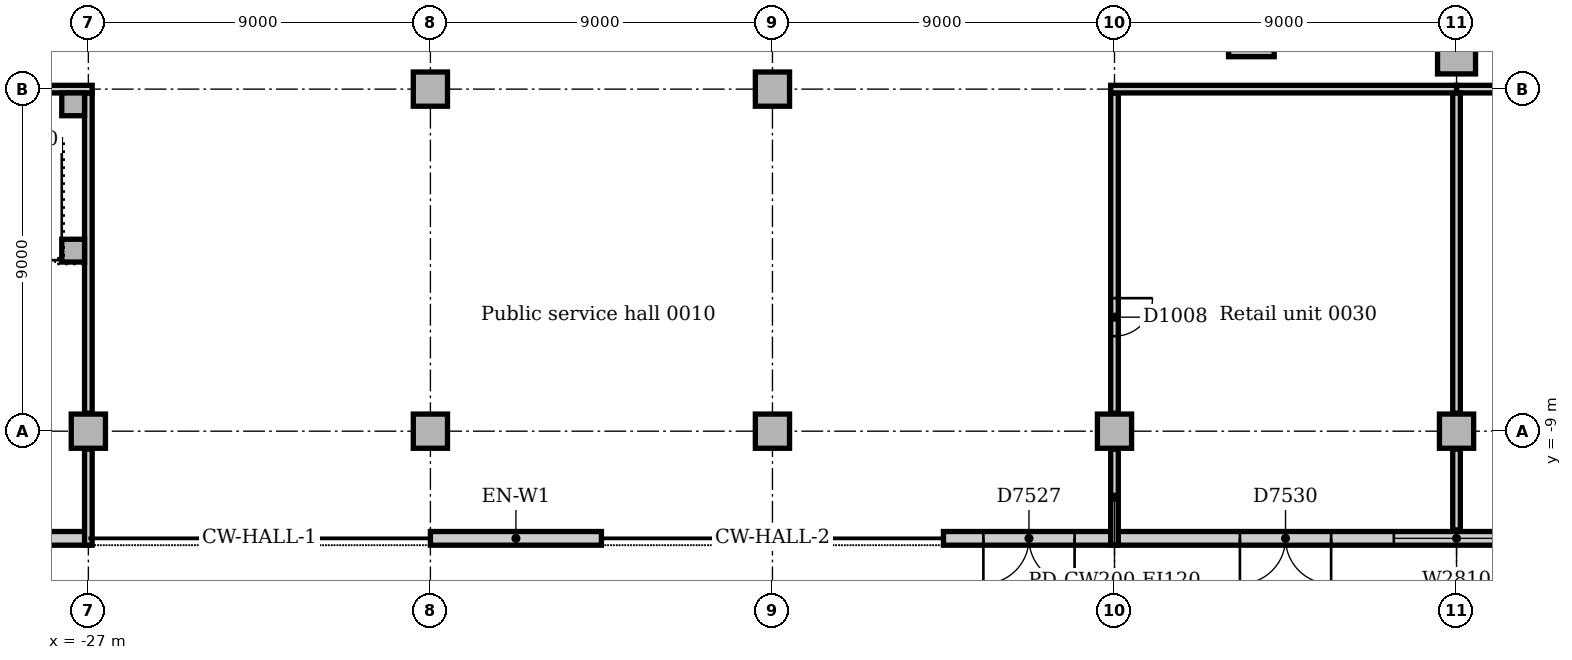
"""IFC4 building model, lengths in metres.
Left out: names, types, materials, properties, quantities, classifications, styles, units other than length and angle.
Written with IfcOpenShell. Run it as: python <this file> out.ifc"""

import sys

from ifc_helpers import new_model, si_unit, direction, frame, frame_2d, origin, origin_2d, place, context, subcontext, project, spatial, rectangle, extrude, element, fill, save


model = new_model("IFC4")
c1 = context("Model", 3, precision=1e-05, world=origin(), true_north=direction((0.0, 1.0)))
c2 = subcontext(c1, "Body", "Model", "MODEL_VIEW")
j1 = project(units=[si_unit("LENGTHUNIT", "METRE"), si_unit("PLANEANGLEUNIT", "RADIAN")], contexts=[c1])
p1 = place(None, origin())
s1 = spatial("IfcSite", under=j1, at=p1, CompositionType="ELEMENT")
p2 = place(p1, origin())
s2 = spatial("IfcBuilding", under=s1, at=p2, CompositionType="ELEMENT")
p3 = place(p2, origin())
s3 = spatial("IfcBuildingStorey", under=s2, at=p3, CompositionType="ELEMENT", Elevation=0.0)
p4 = place(p3, frame((3.602, 1.453, 0.0), z_axis=(0.0, 0.0, 1.0), x_axis=(1.0, 0.0, 0.0)))
e1 = element("IfcColumn", 1, at=p4, inside=s3, PredefinedType="COLUMN", context=c2, shape_type="SweptSolid", body=[
    extrude(rectangle(XDim=1.2, YDim=1.2, at=origin_2d()), origin(), (0.0, 0.0, 1.0), 5.7),
])
p5 = place(p3, frame((9.0, 0.9, 0.0), z_axis=(0.0, 0.0, 1.0), x_axis=(1.0, 0.0, 0.0)))
e2 = element("IfcColumn", 2, at=p5, inside=s3, PredefinedType="COLUMN", context=c2, shape_type="SweptSolid", body=[
    extrude(rectangle(XDim=1.0, YDim=1.0, at=origin_2d()), origin(), (0.0, 0.0, 1.0), 5.7),
])
for number, where, z_axis, x_axis in (
    (3, (-27.0, -9.0, 0.0), (0.0, 0.0, 1.0), (1.0, 0.0, 0.0)),
    (4, (-18.0, -9.0, 0.0), (0.0, 0.0, 1.0), (1.0, 0.0, 0.0)),
    (5, (-18.0, 0.0, 0.0), (0.0, 0.0, 1.0), (1.0, 0.0, 0.0)),
    (6, (-9.0, -9.0, 0.0), (0.0, 0.0, 1.0), (1.0, 0.0, 0.0)),
    (7, (-9.0, 0.0, 0.0), (0.0, 0.0, 1.0), (1.0, 0.0, 0.0)),
    (8, (0.0, -9.0, 0.0), (0.0, 0.0, 1.0), (1.0, 0.0, 0.0)),
    (9, (9.0, -9.0, 0.0), (0.0, 0.0, 1.0), (1.0, 0.0, 0.0)),
):
    element("IfcColumn", number, at=place(p3, frame(where, z_axis=z_axis, x_axis=x_axis)), inside=s3, PredefinedType="COLUMN", context=c2, shape_type="SweptSolid", body=[
        extrude(rectangle(XDim=0.9, YDim=0.9, at=origin_2d()), origin(), (0.0, 0.0, 1.0), 5.7),
    ])
p6 = place(p3, frame((-81.0, -11.82, 0.0), z_axis=(0.0, 0.0, 1.0), x_axis=(1.0, 0.0, 0.0)))
e10 = element("IfcWall", 10, at=p6, inside=s3, PredefinedType="STANDARD", context=c2, shape_type="SweptSolid", body=[
    extrude(rectangle(XDim=54.0, YDim=0.36, at=frame_2d((27.0, 0.0))), origin(), (0.0, 0.0, 1.0), 5.7),
])
p7 = place(p6, frame((22.8, 0.0, 0.0)))
e11 = element("IfcOpeningElement", 11, at=p7, cuts=e10, PredefinedType="OPENING", context=c2, shape_type="SweptSolid", body=[
    extrude(rectangle(XDim=2.4, YDim=2.4, at=frame_2d((1.2, 1.2))), frame((0.0, 0.19, 0.0), z_axis=(0.0, -1.0, 0.0), x_axis=(1.0, 0.0, 0.0)), (0.0, 0.0, 1.0), 0.38),
])
p8 = place(p6, frame((13.8, 0.0, 0.0)))
e12 = element("IfcOpeningElement", 12, at=p8, cuts=e10, PredefinedType="OPENING", context=c2, shape_type="SweptSolid", body=[
    extrude(rectangle(XDim=2.4, YDim=2.2, at=frame_2d((1.2, 1.1))), frame((0.0, 0.19, 0.0), z_axis=(0.0, -1.0, 0.0), x_axis=(1.0, 0.0, 0.0)), (0.0, 0.0, 1.0), 0.38),
])
p9 = place(p6, frame((39.3, 0.0, 0.0)))
e13 = element("IfcOpeningElement", 13, at=p9, cuts=e10, PredefinedType="OPENING", context=c2, shape_type="SweptSolid", body=[
    extrude(rectangle(XDim=2.4, YDim=2.2, at=frame_2d((1.2, 1.1))), frame((0.0, 0.19, 0.0), z_axis=(0.0, -1.0, 0.0), x_axis=(1.0, 0.0, 0.0)), (0.0, 0.0, 1.0), 0.38),
])
p10 = place(p6, frame((2.1, 0.0, 0.0)))
e14 = element("IfcOpeningElement", 14, at=p10, cuts=e10, PredefinedType="OPENING", context=c2, shape_type="SweptSolid", body=[
    extrude(rectangle(XDim=1.8, YDim=2.2, at=frame_2d((0.9, 1.1))), frame((0.0, 0.19, 0.0), z_axis=(0.0, -1.0, 0.0), x_axis=(1.0, 0.0, 0.0)), (0.0, 0.0, 1.0), 0.38),
])
p11 = place(p6, frame((30.6, 0.0, 0.0)))
e15 = element("IfcOpeningElement", 15, at=p11, cuts=e10, PredefinedType="OPENING", context=c2, shape_type="SweptSolid", body=[
    extrude(rectangle(XDim=1.8, YDim=2.2, at=frame_2d((0.9, 1.1))), frame((0.0, 0.19, 0.0), z_axis=(0.0, -1.0, 0.0), x_axis=(1.0, 0.0, 0.0)), (0.0, 0.0, 1.0), 0.38),
])
p12 = place(p6, frame((48.6, 0.0, 0.0)))
e16 = element("IfcOpeningElement", 16, at=p12, cuts=e10, PredefinedType="OPENING", context=c2, shape_type="SweptSolid", body=[
    extrude(rectangle(XDim=1.8, YDim=2.2, at=frame_2d((0.9, 1.1))), frame((0.0, 0.19, 0.0), z_axis=(0.0, -1.0, 0.0), x_axis=(1.0, 0.0, 0.0)), (0.0, 0.0, 1.0), 0.38),
])
p13 = place(p6, frame((7.35, 0.0, 0.6)))
e17 = element("IfcOpeningElement", 17, at=p13, cuts=e10, PredefinedType="OPENING", context=c2, shape_type="SweptSolid", body=[
    extrude(rectangle(XDim=3.3, YDim=3.0, at=frame_2d((1.65, 1.5))), frame((0.0, 0.19, 0.0), z_axis=(0.0, -1.0, 0.0), x_axis=(1.0, 0.0, 0.0)), (0.0, 0.0, 1.0), 0.38),
])
p14 = place(p6, frame((34.35, 0.0, 0.6)))
e18 = element("IfcOpeningElement", 18, at=p14, cuts=e10, PredefinedType="OPENING", context=c2, shape_type="SweptSolid", body=[
    extrude(rectangle(XDim=3.3, YDim=3.0, at=frame_2d((1.65, 1.5))), frame((0.0, 0.19, 0.0), z_axis=(0.0, -1.0, 0.0), x_axis=(1.0, 0.0, 0.0)), (0.0, 0.0, 1.0), 0.38),
])
p15 = place(p6, frame((43.35, 0.0, 0.6)))
e19 = element("IfcOpeningElement", 19, at=p15, cuts=e10, PredefinedType="OPENING", context=c2, shape_type="SweptSolid", body=[
    extrude(rectangle(XDim=3.3, YDim=3.0, at=frame_2d((1.65, 1.5))), frame((0.0, 0.19, 0.0), z_axis=(0.0, -1.0, 0.0), x_axis=(1.0, 0.0, 0.0)), (0.0, 0.0, 1.0), 0.38),
])
p16 = place(p3, frame((-18.0, -11.82, 0.0), z_axis=(0.0, 0.0, 1.0), x_axis=(1.0, 0.0, 0.0)))
e20 = element("IfcWall", 20, at=p16, inside=s3, PredefinedType="STANDARD", context=c2, shape_type="SweptSolid", body=[
    extrude(rectangle(XDim=4.5, YDim=0.36, at=frame_2d((2.25, 0.0))), origin(), (0.0, 0.0, 1.0), 5.7),
])
p17 = place(p3, frame((-4.5, -11.82, 0.0), z_axis=(0.0, 0.0, 1.0), x_axis=(1.0, 0.0, 0.0)))
e21 = element("IfcWall", 21, at=p17, inside=s3, PredefinedType="STANDARD", context=c2, shape_type="SweptSolid", body=[
    extrude(rectangle(XDim=67.5, YDim=0.36, at=frame_2d((33.75, 0.0))), origin(), (0.0, 0.0, 1.0), 5.7),
])
p18 = place(p17, frame((1.05, 0.0, 0.0)))
e22 = element("IfcOpeningElement", 22, at=p18, cuts=e21, PredefinedType="OPENING", context=c2, shape_type="SweptSolid", body=[
    extrude(rectangle(XDim=2.4, YDim=2.4, at=frame_2d((1.2, 1.2))), frame((0.0, 0.19, 0.0), z_axis=(0.0, -1.0, 0.0), x_axis=(1.0, 0.0, 0.0)), (0.0, 0.0, 1.0), 0.38),
])
p19 = place(p17, frame((48.3, 0.0, 0.0)))
e23 = element("IfcOpeningElement", 23, at=p19, cuts=e21, PredefinedType="OPENING", context=c2, shape_type="SweptSolid", body=[
    extrude(rectangle(XDim=2.4, YDim=2.4, at=frame_2d((1.2, 1.2))), frame((0.0, 0.19, 0.0), z_axis=(0.0, -1.0, 0.0), x_axis=(1.0, 0.0, 0.0)), (0.0, 0.0, 1.0), 0.38),
])
p20 = place(p17, frame((34.8, 0.0, 0.0)))
e24 = element("IfcOpeningElement", 24, at=p20, cuts=e21, PredefinedType="OPENING", context=c2, shape_type="SweptSolid", body=[
    extrude(rectangle(XDim=2.4, YDim=2.4, at=frame_2d((1.2, 1.2))), frame((0.0, 0.19, 0.0), z_axis=(0.0, -1.0, 0.0), x_axis=(1.0, 0.0, 0.0)), (0.0, 0.0, 1.0), 0.38),
])
p21 = place(p17, frame((7.8, 0.0, 0.0)))
e25 = element("IfcOpeningElement", 25, at=p21, cuts=e21, PredefinedType="OPENING", context=c2, shape_type="SweptSolid", body=[
    extrude(rectangle(XDim=2.4, YDim=2.4, at=frame_2d((1.2, 1.2))), frame((0.0, 0.19, 0.0), z_axis=(0.0, -1.0, 0.0), x_axis=(1.0, 0.0, 0.0)), (0.0, 0.0, 1.0), 0.38),
])
p22 = place(p17, frame((17.1, 0.0, 0.0)))
e26 = element("IfcOpeningElement", 26, at=p22, cuts=e21, PredefinedType="OPENING", context=c2, shape_type="SweptSolid", body=[
    extrude(rectangle(XDim=1.8, YDim=2.2, at=frame_2d((0.9, 1.1))), frame((0.0, 0.19, 0.0), z_axis=(0.0, -1.0, 0.0), x_axis=(1.0, 0.0, 0.0)), (0.0, 0.0, 1.0), 0.38),
])
p23 = place(p17, frame((63.6, 0.0, 0.0)))
e27 = element("IfcOpeningElement", 27, at=p23, cuts=e21, PredefinedType="OPENING", context=c2, shape_type="SweptSolid", body=[
    extrude(rectangle(XDim=1.8, YDim=2.2, at=frame_2d((0.9, 1.1))), frame((0.0, 0.19, 0.0), z_axis=(0.0, -1.0, 0.0), x_axis=(1.0, 0.0, 0.0)), (0.0, 0.0, 1.0), 0.38),
])
p24 = place(p17, frame((11.85, 0.0, 0.6)))
e28 = element("IfcOpeningElement", 28, at=p24, cuts=e21, PredefinedType="OPENING", context=c2, shape_type="SweptSolid", body=[
    extrude(rectangle(XDim=3.3, YDim=3.0, at=frame_2d((1.65, 1.5))), frame((0.0, 0.19, 0.0), z_axis=(0.0, -1.0, 0.0), x_axis=(1.0, 0.0, 0.0)), (0.0, 0.0, 1.0), 0.38),
])
p25 = place(p17, frame((20.85, 0.0, 0.6)))
e29 = element("IfcOpeningElement", 29, at=p25, cuts=e21, PredefinedType="OPENING", context=c2, shape_type="SweptSolid", body=[
    extrude(rectangle(XDim=3.3, YDim=3.0, at=frame_2d((1.65, 1.5))), frame((0.0, 0.19, 0.0), z_axis=(0.0, -1.0, 0.0), x_axis=(1.0, 0.0, 0.0)), (0.0, 0.0, 1.0), 0.38),
])
p26 = place(p17, frame((25.35, 0.0, 0.6)))
e30 = element("IfcOpeningElement", 30, at=p26, cuts=e21, PredefinedType="OPENING", context=c2, shape_type="SweptSolid", body=[
    extrude(rectangle(XDim=3.3, YDim=3.0, at=frame_2d((1.65, 1.5))), frame((0.0, 0.19, 0.0), z_axis=(0.0, -1.0, 0.0), x_axis=(1.0, 0.0, 0.0)), (0.0, 0.0, 1.0), 0.38),
])
p27 = place(p17, frame((29.85, 0.0, 0.6)))
e31 = element("IfcOpeningElement", 31, at=p27, cuts=e21, PredefinedType="OPENING", context=c2, shape_type="SweptSolid", body=[
    extrude(rectangle(XDim=3.3, YDim=3.0, at=frame_2d((1.65, 1.5))), frame((0.0, 0.19, 0.0), z_axis=(0.0, -1.0, 0.0), x_axis=(1.0, 0.0, 0.0)), (0.0, 0.0, 1.0), 0.38),
])
p28 = place(p17, frame((38.85, 0.0, 0.6)))
e32 = element("IfcOpeningElement", 32, at=p28, cuts=e21, PredefinedType="OPENING", context=c2, shape_type="SweptSolid", body=[
    extrude(rectangle(XDim=3.3, YDim=3.0, at=frame_2d((1.65, 1.5))), frame((0.0, 0.19, 0.0), z_axis=(0.0, -1.0, 0.0), x_axis=(1.0, 0.0, 0.0)), (0.0, 0.0, 1.0), 0.38),
])
p29 = place(p17, frame((43.35, 0.0, 0.6)))
e33 = element("IfcOpeningElement", 33, at=p29, cuts=e21, PredefinedType="OPENING", context=c2, shape_type="SweptSolid", body=[
    extrude(rectangle(XDim=3.3, YDim=3.0, at=frame_2d((1.65, 1.5))), frame((0.0, 0.19, 0.0), z_axis=(0.0, -1.0, 0.0), x_axis=(1.0, 0.0, 0.0)), (0.0, 0.0, 1.0), 0.38),
])
p30 = place(p17, frame((52.35, 0.0, 0.6)))
e34 = element("IfcOpeningElement", 34, at=p30, cuts=e21, PredefinedType="OPENING", context=c2, shape_type="SweptSolid", body=[
    extrude(rectangle(XDim=3.3, YDim=3.0, at=frame_2d((1.65, 1.5))), frame((0.0, 0.19, 0.0), z_axis=(0.0, -1.0, 0.0), x_axis=(1.0, 0.0, 0.0)), (0.0, 0.0, 1.0), 0.38),
])
p31 = place(p17, frame((56.85, 0.0, 0.6)))
e35 = element("IfcOpeningElement", 35, at=p31, cuts=e21, PredefinedType="OPENING", context=c2, shape_type="SweptSolid", body=[
    extrude(rectangle(XDim=3.3, YDim=3.0, at=frame_2d((1.65, 1.5))), frame((0.0, 0.19, 0.0), z_axis=(0.0, -1.0, 0.0), x_axis=(1.0, 0.0, 0.0)), (0.0, 0.0, 1.0), 0.38),
])
for number, where, z_axis, x_axis in (
    (36, (-27.4, -4.25, 0.0), (0.0, 0.0, 1.0), (1.0, 0.0, 0.0)),
    (37, (-27.4, -0.4, 0.0), (0.0, 0.0, 1.0), (1.0, 0.0, 0.0)),
):
    element("IfcColumn", number, at=place(p3, frame(where, z_axis=z_axis, x_axis=x_axis)), inside=s3, PredefinedType="COLUMN", context=c2, shape_type="SweptSolid", body=[
        extrude(rectangle(XDim=0.6, YDim=0.6, at=origin_2d()), origin(), (0.0, 0.0, 1.0), 6.0),
    ])
p32 = place(p3, frame((9.0, 0.0, 0.0), z_axis=(0.0, 0.0, 1.0), x_axis=(1.0, 0.0, 0.0)))
e38 = element("IfcWall", 38, at=p32, inside=s3, PredefinedType="SOLIDWALL", context=c2, shape_type="SweptSolid", body=[
    extrude(rectangle(XDim=9.0, YDim=0.2, at=frame_2d((4.5, 0.0))), origin(), (0.0, 0.0, 1.0), 5.7),
])
p33 = place(p3, frame((9.0, -11.6, 0.0), z_axis=(0.0, 0.0, 1.0), x_axis=(0.0, 1.0, 0.0)))
e39 = element("IfcWall", 39, at=p33, inside=s3, PredefinedType="SOLIDWALL", context=c2, shape_type="SweptSolid", body=[
    extrude(rectangle(XDim=2.13, YDim=0.2, at=frame_2d((1.065, 0.0))), origin(), (0.0, 0.0, 1.0), 5.7),
])
p34 = place(p3, frame((9.0, -8.53, 0.0), z_axis=(0.0, 0.0, 1.0), x_axis=(0.0, 1.0, 0.0)))
e40 = element("IfcWall", 40, at=p34, inside=s3, PredefinedType="SOLIDWALL", context=c2, shape_type="SweptSolid", body=[
    extrude(rectangle(XDim=8.43, YDim=0.2, at=frame_2d((4.215, 0.0))), origin(), (0.0, 0.0, 1.0), 5.7),
])
p35 = place(p3, frame((-27.0, -12.0, 0.0), z_axis=(0.0, 0.0, 1.0), x_axis=(0.0, 1.0, 0.0)))
e41 = element("IfcWall", 41, at=p35, inside=s3, PredefinedType="SOLIDWALL", context=c2, shape_type="SweptSolid", body=[
    extrude(rectangle(XDim=2.53, YDim=0.2, at=frame_2d((1.265, 0.0))), origin(), (0.0, 0.0, 1.0), 5.7),
])
p36 = place(p3, frame((-27.0, -8.53, 0.0), z_axis=(0.0, 0.0, 1.0), x_axis=(0.0, 1.0, 0.0)))
e42 = element("IfcWall", 42, at=p36, inside=s3, PredefinedType="SOLIDWALL", context=c2, shape_type="SweptSolid", body=[
    extrude(rectangle(XDim=8.43, YDim=0.2, at=frame_2d((4.215, 0.0))), origin(), (0.0, 0.0, 1.0), 5.7),
])
p37 = place(p3, frame((-36.0, 0.0, 0.0), z_axis=(0.0, 0.0, 1.0), x_axis=(1.0, 0.0, 0.0)))
e43 = element("IfcWall", 43, at=p37, inside=s3, PredefinedType="SOLIDWALL", context=c2, shape_type="SweptSolid", body=[
    extrude(rectangle(XDim=9.1, YDim=0.2, at=frame_2d((4.55, 0.0))), origin(), (0.0, 0.0, 1.0), 5.7),
])
p38 = place(p3, frame((0.0, -12.0, 0.0), z_axis=(0.0, 0.0, 1.0), x_axis=(0.0, 1.0, 0.0)))
e44 = element("IfcWall", 44, at=p38, inside=s3, PredefinedType="PARTITIONING", context=c2, shape_type="SweptSolid", body=[
    extrude(rectangle(XDim=2.53, YDim=0.2, at=frame_2d((1.265, 0.0))), origin(), (0.0, 0.0, 1.0), 5.7),
])
p39 = place(p3, frame((0.0, -8.53, 0.0), z_axis=(0.0, 0.0, 1.0), x_axis=(0.0, 1.0, 0.0)))
e45 = element("IfcWall", 45, at=p39, inside=s3, PredefinedType="PARTITIONING", context=c2, shape_type="SweptSolid", body=[
    extrude(rectangle(XDim=8.43, YDim=0.2, at=frame_2d((4.215, 0.0))), origin(), (0.0, 0.0, 1.0), 5.7),
])
p40 = place(p39, frame((2.03, 0.0, 0.0)))
e46 = element("IfcOpeningElement", 46, at=p40, cuts=e45, PredefinedType="OPENING", context=c2, shape_type="SweptSolid", body=[
    extrude(rectangle(XDim=1.0, YDim=2.1, at=frame_2d((0.5, 1.05))), frame((0.0, 0.11, 0.0), z_axis=(0.0, -1.0, 0.0), x_axis=(1.0, 0.0, 0.0)), (0.0, 0.0, 1.0), 0.22),
])
p41 = place(p3, frame((-0.1, 0.0, 0.0), z_axis=(0.0, 0.0, 1.0), x_axis=(1.0, 0.0, 0.0)))
e47 = element("IfcWall", 47, at=p41, inside=s3, PredefinedType="PARTITIONING", context=c2, shape_type="SweptSolid", body=[
    extrude(rectangle(XDim=9.1, YDim=0.2, at=frame_2d((4.55, 0.0))), origin(), (0.0, 0.0, 1.0), 5.7),
])
p42 = place(p18, frame((2.4, 0.0, 0.0), z_axis=(0.0, 0.0, 1.0), x_axis=(-1.0, 0.0, 0.0)))
e48 = element("IfcDoor", 48, at=p42, inside=s3, OperationType="DOUBLE_DOOR_SINGLE_SWING", PredefinedType="DOOR", context=c2, shape_type="SweptSolid", body=[
    extrude(rectangle(XDim=2.4, YDim=2.4, at=frame_2d((1.2, 1.2))), frame((0.0, -0.07, 0.0), z_axis=(0.0, -1.0, 0.0), x_axis=(1.0, 0.0, 0.0)), (0.0, 0.0, 1.0), 0.05),
])
fill(e22, e48)
p43 = place(p21, frame((2.4, 0.0, 0.0), z_axis=(0.0, 0.0, 1.0), x_axis=(-1.0, 0.0, 0.0)))
e49 = element("IfcDoor", 49, at=p43, inside=s3, OperationType="DOUBLE_DOOR_SINGLE_SWING", PredefinedType="DOOR", context=c2, shape_type="SweptSolid", body=[
    extrude(rectangle(XDim=2.4, YDim=2.4, at=frame_2d((1.2, 1.2))), frame((0.0, -0.07, 0.0), z_axis=(0.0, -1.0, 0.0), x_axis=(1.0, 0.0, 0.0)), (0.0, 0.0, 1.0), 0.05),
])
fill(e25, e49)
p44 = place(p24, origin())
e50 = element("IfcWindow", 50, at=p44, inside=s3, PartitioningType="SINGLE_PANEL", PredefinedType="WINDOW", context=c2, shape_type="SweptSolid", body=[
    extrude(rectangle(XDim=3.3, YDim=3.0, at=frame_2d((1.65, 1.5))), frame((0.0, 0.13, 0.0), z_axis=(0.0, -1.0, 0.0), x_axis=(1.0, 0.0, 0.0)), (0.0, 0.0, 1.0), 0.06),
])
fill(e28, e50)
p45 = place(p40, frame((1.0, 0.0, 0.0), z_axis=(0.0, 0.0, 1.0), x_axis=(-1.0, 0.0, 0.0)))
e51 = element("IfcDoor", 51, at=p45, inside=s3, OperationType="SINGLE_SWING_LEFT", PredefinedType="DOOR", context=c2, shape_type="SweptSolid", body=[
    extrude(rectangle(XDim=1.0, YDim=2.1, at=frame_2d((0.5, 1.05))), frame((0.0, 0.025, 0.0), z_axis=(0.0, -1.0, 0.0), x_axis=(1.0, 0.0, 0.0)), (0.0, 0.0, 1.0), 0.05),
])
fill(e46, e51)
save(model, sys.argv[1])
